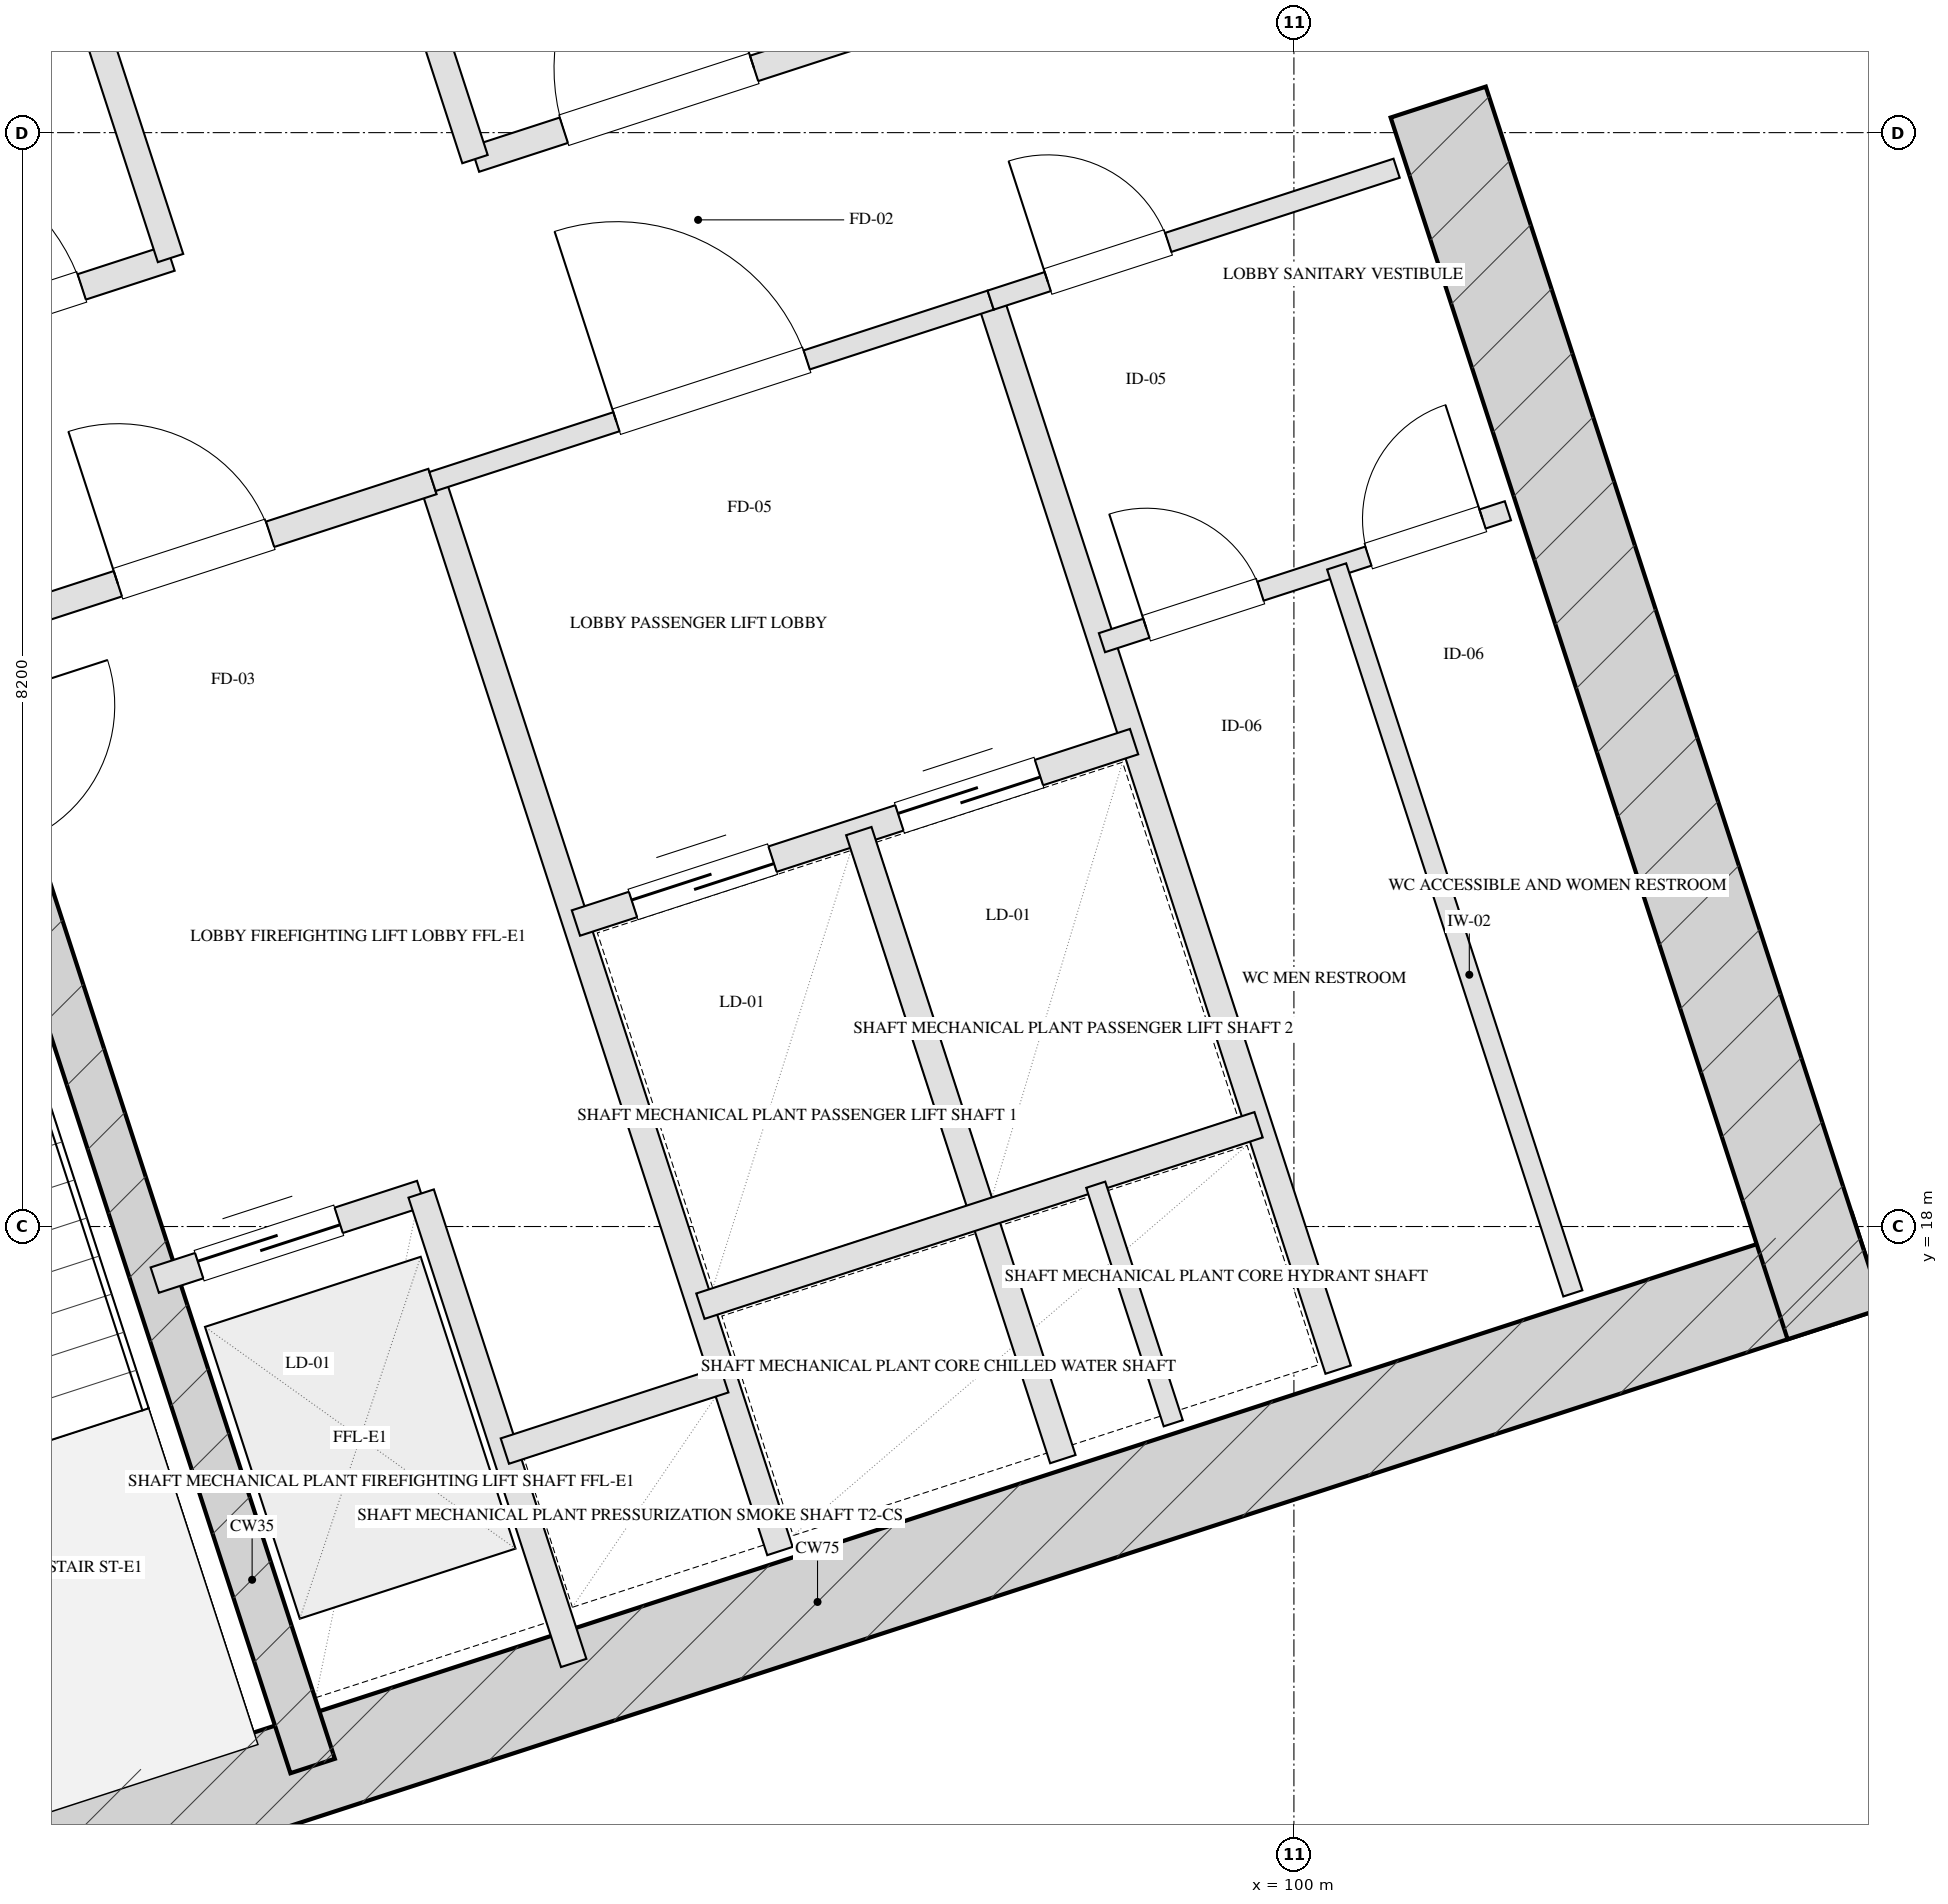
"""IFC4 building model, lengths in metres.
Left out: names, types, materials, properties, quantities, classifications, styles, units other than length and angle.
Written with IfcOpenShell. Run it as: python <this file> out.ifc"""

import sys

from ifc_helpers import new_model, si_unit, direction, frame, frame_2d, origin, place, context, subcontext, project, spatial, rectangle, extrude, element, fill, save


model = new_model("IFC4")
c1 = context("Model", 3, precision=1e-05, world=origin(), true_north=direction((0.0, 1.0)))
c2 = subcontext(c1, "Body", "Model", "MODEL_VIEW")
j1 = project(units=[si_unit("LENGTHUNIT", "METRE"), si_unit("PLANEANGLEUNIT", "RADIAN")], contexts=[c1])
p1 = place(None, origin())
s1 = spatial("IfcSite", under=j1, at=p1, CompositionType="ELEMENT")
p2 = place(p1, origin())
s2 = spatial("IfcBuilding", under=s1, at=p2, CompositionType="ELEMENT")
p3 = place(p2, frame((0.0, 0.0, 92.0)))
s3 = spatial("IfcBuildingStorey", under=s2, at=p3, CompositionType="ELEMENT", Elevation=92.0)
p4 = place(p3, frame((88.559, 12.629, 0.0), z_axis=(0.0, 0.0, 1.0), x_axis=(0.951056072937, 0.309018358888, 0.0)))
e1 = element("IfcWall", 1, at=p4, inside=s3, PredefinedType="SHEAR", context=c2, shape_type="SweptSolid", body=[
    extrude(rectangle(XDim=16.55, YDim=0.75, at=frame_2d((8.275, 0.0))), origin(), (0.0, 0.0, 1.0), 4.6),
])
p5 = place(p3, frame((101.082, 26.429, 0.0), z_axis=(0.0, 0.0, 1.0), x_axis=(0.309016134813, -0.951056795583, 0.0)))
e2 = element("IfcWall", 2, at=p5, inside=s3, PredefinedType="SHEAR", context=c2, shape_type="SweptSolid", body=[
    extrude(rectangle(XDim=9.63, YDim=0.75, at=frame_2d((4.815, 0.0))), origin(), (0.0, 0.0, 1.0), 4.6),
])
p6 = place(p3, frame((90.486, 20.594, 0.0), z_axis=(0.0, 0.0, 1.0), x_axis=(0.309020428229, -0.951055400562, 0.0)))
e3 = element("IfcWall", 3, at=p6, inside=s3, PredefinedType="SHEAR", context=c2, shape_type="SweptSolid", body=[
    extrude(rectangle(XDim=6.98, YDim=0.35, at=frame_2d((3.49, 0.0))), origin(), (0.0, 0.0, 1.0), 4.6),
])
p7 = place(p3, frame((99.284, 61.41, 0.0), z_axis=(0.0, 0.0, 1.0), x_axis=(0.309017542002, -0.95105633836, 0.0)))
e4 = element("IfcWall", 4, at=p7, inside=s3, PredefinedType="SOLIDWALL", context=c2, shape_type="SweptSolid", body=[
    extrude(rectangle(XDim=46.4, YDim=0.4, at=frame_2d((23.2, 0.0))), origin(), (0.0, 0.0, 1.0), 3.7),
])
p8 = place(p3, frame((111.953, 14.005, 0.0), z_axis=(0.0, 0.0, 1.0), x_axis=(-0.95105505922, -0.309021478754, 0.0)))
e5 = element("IfcWall", 5, at=p8, inside=s3, PredefinedType="SOLIDWALL", context=c2, shape_type="SweptSolid", body=[
    extrude(rectangle(XDim=29.4, YDim=0.4, at=frame_2d((14.7, 0.0))), origin(), (0.0, 0.0, 1.0), 3.7),
])
p9 = place(p3, frame((93.542, 23.585, 0.0), z_axis=(0.0, 0.0, 1.0), x_axis=(0.309042196757, -0.951048327176, 0.0)))
e6 = element("IfcWall", 6, at=p9, inside=s3, PredefinedType="PARTITIONING", context=c2, shape_type="SweptSolid", body=[
    extrude(rectangle(XDim=8.43, YDim=0.2, at=frame_2d((4.215, 0.0))), origin(), (0.0, 0.0, 1.0), 4.305),
])
p10 = place(p3, frame((89.899, 22.401, 0.0), z_axis=(0.0, 0.0, 1.0), x_axis=(0.951046716504, 0.309047153403, 0.0)))
e7 = element("IfcWall", 7, at=p10, inside=s3, PredefinedType="PARTITIONING", context=c2, shape_type="SweptSolid", body=[
    extrude(rectangle(XDim=3.83, YDim=0.2, at=frame_2d((1.915, 0.0))), origin(), (0.0, 0.0, 1.0), 4.305),
])
p11 = place(p10, frame((1.35, 0.0, 0.0)))
e8 = element("IfcOpeningElement", 8, at=p11, cuts=e7, PredefinedType="OPENING", context=c2, shape_type="SweptSolid", body=[
    extrude(rectangle(XDim=1.2, YDim=2.05, at=frame_2d((0.6, 1.025))), frame((0.0, 0.11, 0.0), z_axis=(0.0, -1.0, 0.0), x_axis=(1.0, 0.0, 0.0)), (0.0, 0.0, 1.0), 0.22),
])
p12 = place(p3, frame((91.46, 17.598, 0.0), z_axis=(0.0, 0.0, 1.0), x_axis=(0.951062257173, 0.308999325213, 0.0)))
e9 = element("IfcWall", 9, at=p12, inside=s3, PredefinedType="PARTITIONING", context=c2, shape_type="SweptSolid", body=[
    extrude(rectangle(XDim=2.1, YDim=0.2, at=frame_2d((1.05, 0.0))), origin(), (0.0, 0.0, 1.0), 4.305),
])
p13 = place(p12, frame((0.35, 0.0, 0.0)))
e10 = element("IfcOpeningElement", 10, at=p13, cuts=e9, PredefinedType="OPENING", context=c2, shape_type="SweptSolid", body=[
    extrude(rectangle(XDim=1.1, YDim=2.05, at=frame_2d((0.55, 1.025))), frame((0.0, 0.11, 0.0), z_axis=(0.0, -1.0, 0.0), x_axis=(1.0, 0.0, 0.0)), (0.0, 0.0, 1.0), 0.22),
])
p14 = place(p3, frame((93.457, 18.247, 0.0), z_axis=(0.0, 0.0, 1.0), x_axis=(0.3089935693, -0.951064127245, 0.0)))
e11 = element("IfcWall", 11, at=p14, inside=s3, PredefinedType="PARTITIONING", context=c2, shape_type="SweptSolid", body=[
    extrude(rectangle(XDim=3.7, YDim=0.2, at=frame_2d((1.85, 0.0))), origin(), (0.0, 0.0, 1.0), 4.305),
])
p15 = place(p3, frame((94.084, 16.317, 0.0), z_axis=(0.0, 0.0, 1.0), x_axis=(0.951041328149, 0.309063734775, 0.0)))
e12 = element("IfcWall", 12, at=p15, inside=s3, PredefinedType="PARTITIONING", context=c2, shape_type="SweptSolid", body=[
    extrude(rectangle(XDim=1.73, YDim=0.2, at=frame_2d((0.865, 0.0))), origin(), (0.0, 0.0, 1.0), 4.305),
])
p16 = place(p3, frame((97.727, 24.944, 0.0), z_axis=(0.0, 0.0, 1.0), x_axis=(0.309016001439, -0.951056838919, 0.0)))
e13 = element("IfcWall", 13, at=p16, inside=s3, PredefinedType="PARTITIONING", context=c2, shape_type="SweptSolid", body=[
    extrude(rectangle(XDim=8.43, YDim=0.2, at=frame_2d((4.215, 0.0))), origin(), (0.0, 0.0, 1.0), 4.305),
])
p17 = place(p3, frame((93.542, 23.585, 0.0), z_axis=(0.0, 0.0, 1.0), x_axis=(0.951063829732, 0.308994485023, 0.0)))
e14 = element("IfcWall", 14, at=p17, inside=s3, PredefinedType="PARTITIONING", context=c2, shape_type="SweptSolid", body=[
    extrude(rectangle(XDim=4.4, YDim=0.15, at=frame_2d((2.2, 0.0))), origin(), (0.0, 0.0, 1.0), 4.305),
])
p18 = place(p17, frame((1.45, 0.0, 0.0)))
e15 = element("IfcOpeningElement", 15, at=p18, cuts=e14, PredefinedType="OPENING", context=c2, shape_type="SweptSolid", body=[
    extrude(rectangle(XDim=1.5, YDim=2.05, at=frame_2d((0.75, 1.025))), frame((0.0, 0.085, 0.0), z_axis=(0.0, -1.0, 0.0), x_axis=(1.0, 0.0, 0.0)), (0.0, 0.0, 1.0), 0.17),
])
p19 = place(p3, frame((94.617, 20.275, 0.0), z_axis=(0.0, 0.0, 1.0), x_axis=(0.951058531764, 0.30901079133, 0.0)))
e16 = element("IfcWall", 16, at=p19, inside=s3, PredefinedType="PARTITIONING", context=c2, shape_type="SweptSolid", body=[
    extrude(rectangle(XDim=4.4, YDim=0.2, at=frame_2d((2.2, 0.0))), origin(), (0.0, 0.0, 1.0), 4.305),
])
p20 = place(p19, frame((0.45, 0.0, 0.0)))
e17 = element("IfcOpeningElement", 17, at=p20, cuts=e16, PredefinedType="OPENING", context=c2, shape_type="SweptSolid", body=[
    extrude(rectangle(XDim=1.1, YDim=2.05, at=frame_2d((0.55, 1.025))), frame((0.0, 0.11, 0.0), z_axis=(0.0, -1.0, 0.0), x_axis=(1.0, 0.0, 0.0)), (0.0, 0.0, 1.0), 0.22),
])
p21 = place(p19, frame((2.55, 0.0, 0.0)))
e18 = element("IfcOpeningElement", 18, at=p21, cuts=e16, PredefinedType="OPENING", context=c2, shape_type="SweptSolid", body=[
    extrude(rectangle(XDim=1.1, YDim=2.05, at=frame_2d((0.55, 1.025))), frame((0.0, 0.11, 0.0), z_axis=(0.0, -1.0, 0.0), x_axis=(1.0, 0.0, 0.0)), (0.0, 0.0, 1.0), 0.22),
])
p22 = place(p3, frame((96.738, 20.964, 0.0), z_axis=(0.0, 0.0, 1.0), x_axis=(0.309042578481, -0.951048203135, 0.0)))
e19 = element("IfcWall", 19, at=p22, inside=s3, PredefinedType="PARTITIONING", context=c2, shape_type="SweptSolid", body=[
    extrude(rectangle(XDim=4.95, YDim=0.2, at=frame_2d((2.475, 0.0))), origin(), (0.0, 0.0, 1.0), 4.305),
])
p23 = place(p3, frame((95.551, 17.403, 0.0), z_axis=(0.0, 0.0, 1.0), x_axis=(0.951058531764, 0.30901079133, 0.0)))
e20 = element("IfcWall", 20, at=p23, inside=s3, PredefinedType="PARTITIONING", context=c2, shape_type="SweptSolid", body=[
    extrude(rectangle(XDim=4.4, YDim=0.2, at=frame_2d((2.2, 0.0))), origin(), (0.0, 0.0, 1.0), 4.305),
])
p24 = place(p3, frame((98.514, 18.313, 0.0), z_axis=(0.0, 0.0, 1.0), x_axis=(0.309089008895, -0.951033114345, 0.0)))
e21 = element("IfcWall", 21, at=p24, inside=s3, PredefinedType="PARTITIONING", context=c2, shape_type="SweptSolid", body=[
    extrude(rectangle(XDim=1.88, YDim=0.15, at=frame_2d((0.94, 0.0))), origin(), (0.0, 0.0, 1.0), 4.305),
])
p25 = place(p3, frame((97.727, 24.944, 0.0), z_axis=(0.0, 0.0, 1.0), x_axis=(0.951036872128, 0.309077446369, 0.0)))
e22 = element("IfcWall", 22, at=p25, inside=s3, PredefinedType="PARTITIONING", context=c2, shape_type="SweptSolid", body=[
    extrude(rectangle(XDim=3.2, YDim=0.15, at=frame_2d((1.6, 0.0))), origin(), (0.0, 0.0, 1.0), 4.305),
])
p26 = place(p25, frame((0.45, 0.0, 0.0)))
e23 = element("IfcOpeningElement", 23, at=p26, cuts=e22, PredefinedType="OPENING", context=c2, shape_type="SweptSolid", body=[
    extrude(rectangle(XDim=0.95, YDim=2.05, at=frame_2d((0.475, 1.025))), frame((0.0, 0.085, 0.0), z_axis=(0.0, -1.0, 0.0), x_axis=(1.0, 0.0, 0.0)), (0.0, 0.0, 1.0), 0.17),
])
p27 = place(p3, frame((98.561, 22.376, 0.0), z_axis=(0.0, 0.0, 1.0), x_axis=(0.95104415986, 0.309055020985, 0.0)))
e24 = element("IfcWall", 24, at=p27, inside=s3, PredefinedType="PARTITIONING", context=c2, shape_type="SweptSolid", body=[
    extrude(rectangle(XDim=3.2, YDim=0.15, at=frame_2d((1.6, 0.0))), origin(), (0.0, 0.0, 1.0), 4.305),
])
p28 = place(p27, frame((0.35, 0.0, 0.0)))
e25 = element("IfcOpeningElement", 25, at=p28, cuts=e24, PredefinedType="OPENING", context=c2, shape_type="SweptSolid", body=[
    extrude(rectangle(XDim=0.9, YDim=2.05, at=frame_2d((0.45, 1.025))), frame((0.0, 0.085, 0.0), z_axis=(0.0, -1.0, 0.0), x_axis=(1.0, 0.0, 0.0)), (0.0, 0.0, 1.0), 0.17),
])
p29 = place(p27, frame((2.1, 0.0, 0.0)))
e26 = element("IfcOpeningElement", 26, at=p29, cuts=e24, PredefinedType="OPENING", context=c2, shape_type="SweptSolid", body=[
    extrude(rectangle(XDim=0.9, YDim=2.05, at=frame_2d((0.45, 1.025))), frame((0.0, 0.085, 0.0), z_axis=(0.0, -1.0, 0.0), x_axis=(1.0, 0.0, 0.0)), (0.0, 0.0, 1.0), 0.17),
])
p30 = place(p3, frame((100.32, 22.948, 0.0), z_axis=(0.0, 0.0, 1.0), x_axis=(0.309035009867, -0.951050662518, 0.0)))
e27 = element("IfcWall", 27, at=p30, inside=s3, PredefinedType="PARTITIONING", context=c2, shape_type="SweptSolid", body=[
    extrude(rectangle(XDim=5.73, YDim=0.15, at=frame_2d((2.865, 0.0))), origin(), (0.0, 0.0, 1.0), 4.305),
])
p31 = place(p3, frame((76.456, 20.346, 0.0), z_axis=(0.0, 0.0, 1.0), x_axis=(0.951057423626, 0.309014201884, 0.0)))
e28 = element("IfcWall", 28, at=p31, inside=s3, PredefinedType="PARTITIONING", context=c2, shape_type="SweptSolid", body=[
    extrude(rectangle(XDim=15.9, YDim=0.2, at=frame_2d((7.95, 0.0))), origin(), (0.0, 0.0, 1.0), 3.515),
])
p32 = place(p31, frame((13.7, 0.0, 0.0)))
e29 = element("IfcOpeningElement", 29, at=p32, cuts=e28, PredefinedType="OPENING", context=c2, shape_type="SweptSolid", body=[
    extrude(rectangle(XDim=1.5, YDim=2.05, at=frame_2d((0.75, 1.025))), frame((0.0, 0.11, 0.0), z_axis=(0.0, -1.0, 0.0), x_axis=(1.0, 0.0, 0.0)), (0.0, 0.0, 1.0), 0.22),
])
p33 = place(p3, frame((93.861, 26.001, 0.0), z_axis=(0.0, 0.0, 1.0), x_axis=(0.951057423626, 0.309014201884, 0.0)))
e30 = element("IfcWall", 30, at=p33, inside=s3, PredefinedType="PARTITIONING", context=c2, shape_type="SweptSolid", body=[
    extrude(rectangle(XDim=15.9, YDim=0.2, at=frame_2d((7.95, 0.0))), origin(), (0.0, 0.0, 1.0), 3.515),
])
p34 = place(p33, frame((0.7, 0.0, 0.0)))
e31 = element("IfcOpeningElement", 31, at=p34, cuts=e30, PredefinedType="OPENING", context=c2, shape_type="SweptSolid", body=[
    extrude(rectangle(XDim=1.5, YDim=2.05, at=frame_2d((0.75, 1.025))), frame((0.0, 0.11, 0.0), z_axis=(0.0, -1.0, 0.0), x_axis=(1.0, 0.0, 0.0)), (0.0, 0.0, 1.0), 0.22),
])
p35 = place(p3, frame((91.578, 25.26, 0.0), z_axis=(0.0, 0.0, 1.0), x_axis=(-0.30901518495, 0.951057104211, 0.0)))
e32 = element("IfcWall", 32, at=p35, inside=s3, PredefinedType="PARTITIONING", context=c2, shape_type="SweptSolid", body=[
    extrude(rectangle(XDim=17.6, YDim=0.2, at=frame_2d((8.8, 0.0))), origin(), (0.0, 0.0, 1.0), 4.305),
])
p36 = place(p35, frame((8.2, 0.0, 0.0)))
e33 = element("IfcOpeningElement", 33, at=p36, cuts=e32, PredefinedType="OPENING", context=c2, shape_type="SweptSolid", body=[
    extrude(rectangle(XDim=1.2, YDim=2.05, at=frame_2d((0.6, 1.025))), frame((0.0, 0.11, 0.0), z_axis=(0.0, -1.0, 0.0), x_axis=(1.0, 0.0, 0.0)), (0.0, 0.0, 1.0), 0.22),
])
p37 = place(p3, frame((93.861, 26.001, 0.0), z_axis=(0.0, 0.0, 1.0), x_axis=(-0.30901518495, 0.951057104211, 0.0)))
e34 = element("IfcWall", 34, at=p37, inside=s3, PredefinedType="PARTITIONING", context=c2, shape_type="SweptSolid", body=[
    extrude(rectangle(XDim=17.6, YDim=0.2, at=frame_2d((8.8, 0.0))), origin(), (0.0, 0.0, 1.0), 4.305),
])
p38 = place(p37, frame((8.2, 0.0, 0.0)))
e35 = element("IfcOpeningElement", 35, at=p38, cuts=e34, PredefinedType="OPENING", context=c2, shape_type="SweptSolid", body=[
    extrude(rectangle(XDim=1.2, YDim=2.05, at=frame_2d((0.6, 1.025))), frame((0.0, 0.11, 0.0), z_axis=(0.0, -1.0, 0.0), x_axis=(1.0, 0.0, 0.0)), (0.0, 0.0, 1.0), 0.22),
])
p39 = place(p11, origin())
e36 = element("IfcDoor", 36, at=p39, inside=s3, OperationType="SINGLE_SWING_LEFT", PredefinedType="DOOR", context=c2, shape_type="SweptSolid", body=[
    extrude(rectangle(XDim=1.2, YDim=2.05, at=frame_2d((0.6, 1.025))), frame((0.0, 0.025, 0.0), z_axis=(0.0, -1.0, 0.0), x_axis=(1.0, 0.0, 0.0)), (0.0, 0.0, 1.0), 0.05),
])
fill(e8, e36)
p40 = place(p13, origin())
e37 = element("IfcDoor", 37, at=p40, inside=s3, OperationType="DOUBLE_DOOR_SLIDING", PredefinedType="DOOR", context=c2, shape_type="SweptSolid", body=[
    extrude(rectangle(XDim=1.1, YDim=2.05, at=frame_2d((0.55, 1.025))), frame((0.0, 0.025, 0.0), z_axis=(0.0, -1.0, 0.0), x_axis=(1.0, 0.0, 0.0)), (0.0, 0.0, 1.0), 0.05),
])
fill(e10, e37)
p41 = place(p18, origin())
e38 = element("IfcDoor", 38, at=p41, inside=s3, OperationType="SINGLE_SWING_LEFT", PredefinedType="DOOR", context=c2, shape_type="SweptSolid", body=[
    extrude(rectangle(XDim=1.5, YDim=2.05, at=frame_2d((0.75, 1.025))), frame((0.0, 0.025, 0.0), z_axis=(0.0, -1.0, 0.0), x_axis=(1.0, 0.0, 0.0)), (0.0, 0.0, 1.0), 0.05),
])
fill(e15, e38)
p42 = place(p20, origin())
e39 = element("IfcDoor", 39, at=p42, inside=s3, OperationType="DOUBLE_DOOR_SLIDING", PredefinedType="DOOR", context=c2, shape_type="SweptSolid", body=[
    extrude(rectangle(XDim=1.1, YDim=2.05, at=frame_2d((0.55, 1.025))), frame((0.0, 0.025, 0.0), z_axis=(0.0, -1.0, 0.0), x_axis=(1.0, 0.0, 0.0)), (0.0, 0.0, 1.0), 0.05),
])
fill(e17, e39)
p43 = place(p21, origin())
e40 = element("IfcDoor", 40, at=p43, inside=s3, OperationType="DOUBLE_DOOR_SLIDING", PredefinedType="DOOR", context=c2, shape_type="SweptSolid", body=[
    extrude(rectangle(XDim=1.1, YDim=2.05, at=frame_2d((0.55, 1.025))), frame((0.0, 0.025, 0.0), z_axis=(0.0, -1.0, 0.0), x_axis=(1.0, 0.0, 0.0)), (0.0, 0.0, 1.0), 0.05),
])
fill(e18, e40)
p44 = place(p26, origin())
e41 = element("IfcDoor", 41, at=p44, inside=s3, OperationType="SINGLE_SWING_LEFT", PredefinedType="DOOR", context=c2, shape_type="SweptSolid", body=[
    extrude(rectangle(XDim=0.95, YDim=2.05, at=frame_2d((0.475, 1.025))), frame((0.0, 0.025, 0.0), z_axis=(0.0, -1.0, 0.0), x_axis=(1.0, 0.0, 0.0)), (0.0, 0.0, 1.0), 0.05),
])
fill(e23, e41)
p45 = place(p28, origin())
e42 = element("IfcDoor", 42, at=p45, inside=s3, OperationType="SINGLE_SWING_LEFT", PredefinedType="DOOR", context=c2, shape_type="SweptSolid", body=[
    extrude(rectangle(XDim=0.9, YDim=2.05, at=frame_2d((0.45, 1.025))), frame((0.0, 0.025, 0.0), z_axis=(0.0, -1.0, 0.0), x_axis=(1.0, 0.0, 0.0)), (0.0, 0.0, 1.0), 0.05),
])
fill(e25, e42)
p46 = place(p29, origin())
e43 = element("IfcDoor", 43, at=p46, inside=s3, OperationType="SINGLE_SWING_RIGHT", PredefinedType="DOOR", context=c2, shape_type="SweptSolid", body=[
    extrude(rectangle(XDim=0.9, YDim=2.05, at=frame_2d((0.45, 1.025))), frame((0.0, 0.025, 0.0), z_axis=(0.0, -1.0, 0.0), x_axis=(1.0, 0.0, 0.0)), (0.0, 0.0, 1.0), 0.05),
])
fill(e26, e43)
p47 = place(p32, origin())
e44 = element("IfcDoor", 44, at=p47, inside=s3, OperationType="SINGLE_SWING_LEFT", PredefinedType="DOOR", context=c2, shape_type="SweptSolid", body=[
    extrude(rectangle(XDim=1.5, YDim=2.05, at=frame_2d((0.75, 1.025))), frame((0.0, 0.025, 0.0), z_axis=(0.0, -1.0, 0.0), x_axis=(1.0, 0.0, 0.0)), (0.0, 0.0, 1.0), 0.05),
])
fill(e29, e44)
p48 = place(p34, origin())
e45 = element("IfcDoor", 45, at=p48, inside=s3, OperationType="SINGLE_SWING_RIGHT", PredefinedType="DOOR", context=c2, shape_type="SweptSolid", body=[
    extrude(rectangle(XDim=1.5, YDim=2.05, at=frame_2d((0.75, 1.025))), frame((0.0, 0.025, 0.0), z_axis=(0.0, -1.0, 0.0), x_axis=(1.0, 0.0, 0.0)), (0.0, 0.0, 1.0), 0.05),
])
fill(e31, e45)
save(model, sys.argv[1])
